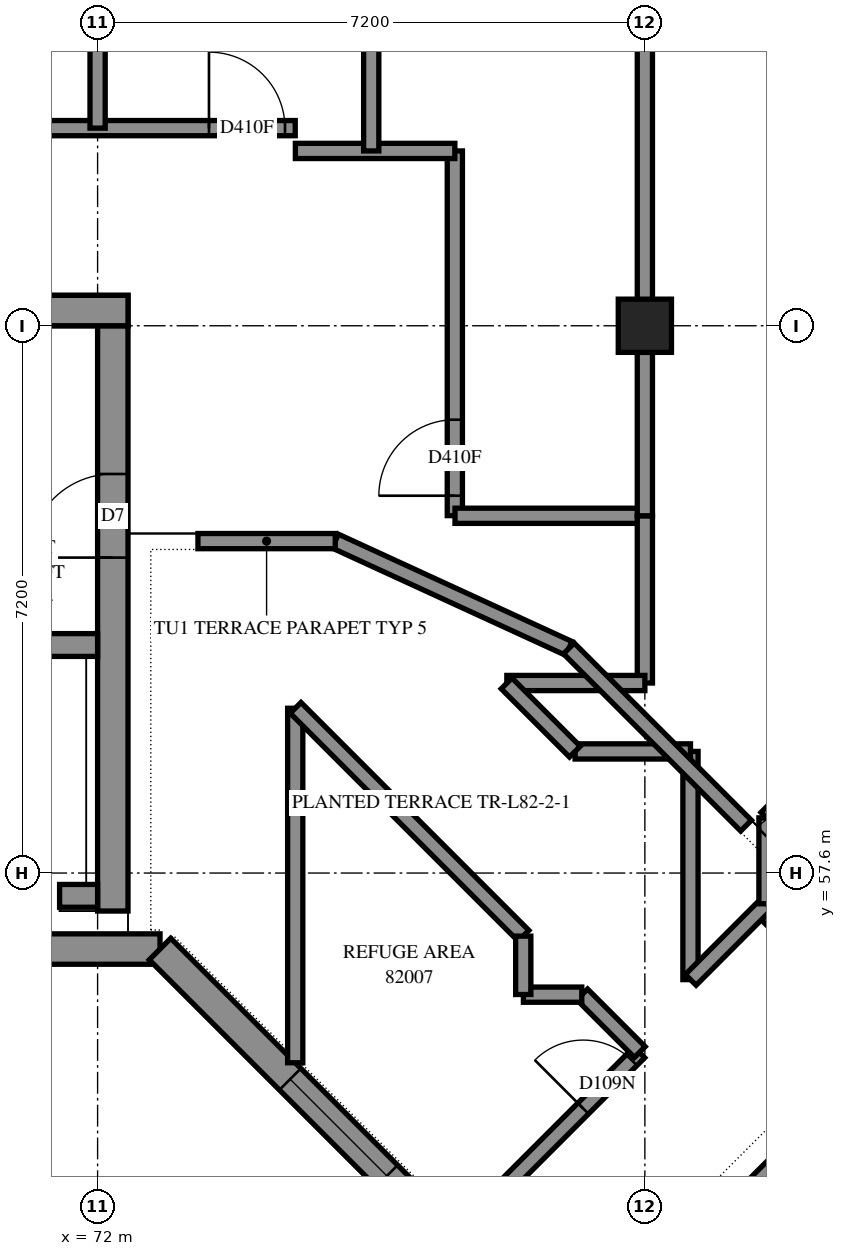
"""IFC4 building model, lengths in metres.
Left out: names, types, materials, properties, quantities, classifications, styles, units other than length and angle.
Written with IfcOpenShell. Run it as: python <this file> out.ifc"""

import sys

from ifc_helpers import new_model, si_unit, direction, frame, frame_2d, origin, origin_2d, place, context, subcontext, project, spatial, polyline, rectangle, outline, extrude, element, fill, save


model = new_model("IFC4")
c1 = context("Model", 3, precision=1e-05, world=origin(), true_north=direction((0.0, 1.0)))
c2 = subcontext(c1, "Body", "Model", "MODEL_VIEW")
j1 = project(units=[si_unit("LENGTHUNIT", "METRE"), si_unit("PLANEANGLEUNIT", "RADIAN")], contexts=[c1])
p1 = place(None, origin())
s1 = spatial("IfcSite", under=j1, at=p1, CompositionType="ELEMENT")
p2 = place(p1, origin())
s2 = spatial("IfcBuilding", under=s1, at=p2, CompositionType="ELEMENT")
p3 = place(p2, frame((0.0, 0.0, 302.0)))
s3 = spatial("IfcBuildingStorey", under=s2, at=p3, CompositionType="ELEMENT", Elevation=302.0)
p4 = place(p3, frame((79.2, 64.8, 0.0), z_axis=(0.0, 0.0, 1.0), x_axis=(1.0, 0.0, 0.0)))
e1 = element("IfcColumn", 1, at=p4, inside=s3, PredefinedType="COLUMN", context=c2, shape_type="SweptSolid", body=[
    extrude(rectangle(XDim=0.7, YDim=0.7, at=origin_2d()), origin(), (0.0, 0.0, 1.0), 3.5),
])
p5 = place(p3, frame((57.2, 65.0, -0.3), z_axis=(0.0, 0.0, 1.0), x_axis=(1.0, 0.0, 0.0)))
e2 = element("IfcWall", 2, at=p5, inside=s3, PredefinedType="SHEAR", context=c2, shape_type="SweptSolid", body=[
    extrude(outline(polyline([(0.0, 0.0), (15.2, 0.0), (15.2, 3.1), (0.0, 3.1), (0.0, 0.0)])), frame((0.0, 0.2, 0.0), z_axis=(0.0, -1.0, 0.0), x_axis=(1.0, 0.0, 0.0)), (0.0, 0.0, 1.0), 0.4),
])
p6 = place(p3, frame((72.2, 57.1, -0.3), z_axis=(0.0, 0.0, 1.0), x_axis=(0.0, 1.0, 0.0)))
e3 = element("IfcWall", 3, at=p6, inside=s3, PredefinedType="SHEAR", context=c2, shape_type="SweptSolid", body=[
    extrude(outline(polyline([(0.0, 0.0), (7.7, 0.0), (7.7, 3.1), (0.0, 3.1), (0.0, 0.0)])), frame((0.0, 0.2, 0.0), z_axis=(0.0, -1.0, 0.0), x_axis=(1.0, 0.0, 0.0)), (0.0, 0.0, 1.0), 0.4),
])
p7 = place(p6, frame((4.65, 0.0, 0.3)))
e4 = element("IfcOpeningElement", 4, at=p7, cuts=e3, PredefinedType="OPENING", context=c2, shape_type="SweptSolid", body=[
    extrude(rectangle(XDim=1.1, YDim=2.1, at=frame_2d((0.55, 1.05))), frame((0.0, 0.21, 0.0), z_axis=(0.0, -1.0, 0.0), x_axis=(1.0, 0.0, 0.0)), (0.0, 0.0, 1.0), 0.42),
])
p8 = place(p3, frame((71.5, 57.3, 0.0), z_axis=(0.0, 0.0, 1.0), x_axis=(1.0, 0.0, 0.0)))
e5 = element("IfcWall", 5, at=p8, inside=s3, PredefinedType="SOLIDWALL", context=c2, shape_type="SweptSolid", body=[
    extrude(outline(polyline([(0.0, 0.0), (0.5, 0.0), (0.5, 3.5), (0.0, 3.5), (0.0, 0.0)])), frame((0.0, 0.15, 0.0), z_axis=(0.0, -1.0, 0.0), x_axis=(1.0, 0.0, 0.0)), (0.0, 0.0, 1.0), 0.3),
])
p9 = place(p3, frame((69.528, 60.6, 0.0), z_axis=(0.0, 0.0, 1.0), x_axis=(1.0, 0.0, 0.0)))
e6 = element("IfcWall", 6, at=p9, inside=s3, PredefinedType="SOLIDWALL", context=c2, shape_type="SweptSolid", body=[
    extrude(outline(polyline([(0.0, 0.0), (2.472, 0.0), (2.472, 3.5), (0.0, 3.5), (0.0, 0.0)])), frame((0.0, 0.15, 0.0), z_axis=(0.0, -1.0, 0.0), x_axis=(1.0, 0.0, 0.0)), (0.0, 0.0, 1.0), 0.3),
])
p10 = place(p3, frame((78.705, 51.423, -0.3), z_axis=(0.0, 0.0, 1.0), x_axis=(0.7071067812, 0.7071067812, 0.0)))
e7 = element("IfcWall", 7, at=p10, inside=s3, PredefinedType="SHEAR", context=c2, shape_type="SweptSolid", body=[
    extrude(outline(polyline([(0.0, 0.0), (11.3, 0.0), (11.3, 3.1), (0.0, 3.1), (0.0, 0.0)])), frame((0.0, 0.2, 0.0), z_axis=(0.0, -1.0, 0.0), x_axis=(1.0, 0.0, 0.0)), (0.0, 0.0, 1.0), 0.4),
])
p11 = place(p10, frame((1.45, 0.0, 0.3)))
e8 = element("IfcOpeningElement", 8, at=p11, cuts=e7, PredefinedType="OPENING", context=c2, shape_type="SweptSolid", body=[
    extrude(rectangle(XDim=1.1, YDim=2.1, at=frame_2d((0.55, 1.05))), frame((0.0, 0.21, 0.0), z_axis=(0.0, -1.0, 0.0), x_axis=(1.0, 0.0, 0.0)), (0.0, 0.0, 1.0), 0.42),
])
p12 = place(p10, frame((8.25, 0.0, 0.3)))
e9 = element("IfcOpeningElement", 9, at=p12, cuts=e7, PredefinedType="OPENING", context=c2, shape_type="SweptSolid", body=[
    extrude(rectangle(XDim=1.1, YDim=2.1, at=frame_2d((0.55, 1.05))), frame((0.0, 0.21, 0.0), z_axis=(0.0, -1.0, 0.0), x_axis=(1.0, 0.0, 0.0)), (0.0, 0.0, 1.0), 0.42),
])
p13 = place(p3, frame((71.0, 56.6, 0.0), z_axis=(0.0, 0.0, 1.0), x_axis=(1.0, 0.0, 0.0)))
e10 = element("IfcWall", 10, at=p13, inside=s3, PredefinedType="SOLIDWALL", context=c2, shape_type="SweptSolid", body=[
    extrude(outline(polyline([(-0.2, -0.2), (1.738, -0.2), (1.904, 0.2), (0.2, 0.2), (-0.2, -0.2)])), origin(), (0.0, 0.0, 1.0), 3.5),
])
p14 = place(p3, frame((72.821, 56.6, 0.0), z_axis=(0.0, 0.0, 1.0), x_axis=(0.7071067812, -0.7071067812, 0.0)))
e11 = element("IfcWall", 11, at=p14, inside=s3, PredefinedType="SOLIDWALL", context=c2, shape_type="SweptSolid", body=[
    extrude(outline(polyline([(0.083, -0.2), (30.821, -0.2), (30.421, 0.2), (-0.083, 0.2), (0.083, -0.2)])), origin(), (0.0, 0.0, 1.0), 3.5),
])
p15 = place(p14, frame((2.421, 0.0, 0.7)))
e12 = element("IfcOpeningElement", 12, at=p15, cuts=e11, PredefinedType="OPENING", context=c2, shape_type="SweptSolid", body=[
    extrude(rectangle(XDim=1.8, YDim=2.2, at=frame_2d((0.9, 1.1))), frame((0.0, 0.21, 0.0), z_axis=(0.0, -1.0, 0.0), x_axis=(1.0, 0.0, 0.0)), (0.0, 0.0, 1.0), 0.42),
])
p16 = place(p14, frame((5.521, 0.0, 0.7)))
e13 = element("IfcOpeningElement", 13, at=p16, cuts=e11, PredefinedType="OPENING", context=c2, shape_type="SweptSolid", body=[
    extrude(rectangle(XDim=1.8, YDim=2.2, at=frame_2d((0.9, 1.1))), frame((0.0, 0.21, 0.0), z_axis=(0.0, -1.0, 0.0), x_axis=(1.0, 0.0, 0.0)), (0.0, 0.0, 1.0), 0.42),
])
p17 = place(p14, frame((8.921, 0.0, 0.7)))
e14 = element("IfcOpeningElement", 14, at=p17, cuts=e11, PredefinedType="OPENING", context=c2, shape_type="SweptSolid", body=[
    extrude(rectangle(XDim=1.8, YDim=2.2, at=frame_2d((0.9, 1.1))), frame((0.0, 0.21, 0.0), z_axis=(0.0, -1.0, 0.0), x_axis=(1.0, 0.0, 0.0)), (0.0, 0.0, 1.0), 0.42),
])
p18 = place(p14, frame((12.521, 0.0, 0.7)))
e15 = element("IfcOpeningElement", 15, at=p18, cuts=e11, PredefinedType="OPENING", context=c2, shape_type="SweptSolid", body=[
    extrude(rectangle(XDim=1.8, YDim=2.2, at=frame_2d((0.9, 1.1))), frame((0.0, 0.21, 0.0), z_axis=(0.0, -1.0, 0.0), x_axis=(1.0, 0.0, 0.0)), (0.0, 0.0, 1.0), 0.42),
])
p19 = place(p14, frame((16.121, 0.0, 0.7)))
e16 = element("IfcOpeningElement", 16, at=p19, cuts=e11, PredefinedType="OPENING", context=c2, shape_type="SweptSolid", body=[
    extrude(rectangle(XDim=1.8, YDim=2.2, at=frame_2d((0.9, 1.1))), frame((0.0, 0.21, 0.0), z_axis=(0.0, -1.0, 0.0), x_axis=(1.0, 0.0, 0.0)), (0.0, 0.0, 1.0), 0.42),
])
p20 = place(p14, frame((19.721, 0.0, 0.7)))
e17 = element("IfcOpeningElement", 17, at=p20, cuts=e11, PredefinedType="OPENING", context=c2, shape_type="SweptSolid", body=[
    extrude(rectangle(XDim=1.8, YDim=2.2, at=frame_2d((0.9, 1.1))), frame((0.0, 0.21, 0.0), z_axis=(0.0, -1.0, 0.0), x_axis=(1.0, 0.0, 0.0)), (0.0, 0.0, 1.0), 0.42),
])
p21 = place(p14, frame((23.071, 0.0, 0.7)))
e18 = element("IfcOpeningElement", 18, at=p21, cuts=e11, PredefinedType="OPENING", context=c2, shape_type="SweptSolid", body=[
    extrude(rectangle(XDim=1.8, YDim=2.2, at=frame_2d((0.9, 1.1))), frame((0.0, 0.21, 0.0), z_axis=(0.0, -1.0, 0.0), x_axis=(1.0, 0.0, 0.0)), (0.0, 0.0, 1.0), 0.42),
])
p22 = place(p14, frame((26.921, 0.0, 0.7)))
e19 = element("IfcOpeningElement", 19, at=p22, cuts=e11, PredefinedType="OPENING", context=c2, shape_type="SweptSolid", body=[
    extrude(rectangle(XDim=1.8, YDim=2.2, at=frame_2d((0.9, 1.1))), frame((0.0, 0.21, 0.0), z_axis=(0.0, -1.0, 0.0), x_axis=(1.0, 0.0, 0.0)), (0.0, 0.0, 1.0), 0.42),
])
p23 = place(p3, frame((78.2, 60.555, 0.0), z_axis=(0.0, 0.0, 1.0), x_axis=(-0.9086892736, 0.4174731177, 0.0)))
e20 = element("IfcWall", 20, at=p23, inside=s3, PredefinedType="PARAPET", context=c2, shape_type="SweptSolid", body=[
    extrude(outline(polyline([(-0.018, -0.1), (3.404, -0.1), (3.36, 0.1), (0.018, 0.1), (-0.018, -0.1)])), origin(), (0.0, 0.0, 1.0), 0.25),
])
p24 = place(p3, frame((57.2, 67.4, 0.0), z_axis=(0.0, 0.0, 1.0), x_axis=(1.0, 0.0, 0.0)))
e21 = element("IfcWall", 21, at=p24, inside=s3, PredefinedType="PARTITIONING", context=c2, shape_type="SweptSolid", body=[
    extrude(rectangle(XDim=17.4, YDim=0.2, at=frame_2d((8.7, 0.0))), origin(), (0.0, 0.0, 1.0), 3.5),
])
p25 = place(p24, frame((1.881, 0.0, 0.0)))
e22 = element("IfcOpeningElement", 22, at=p25, cuts=e21, PredefinedType="OPENING", context=c2, shape_type="SweptSolid", body=[
    extrude(rectangle(XDim=1.0, YDim=2.1, at=frame_2d((0.5, 1.05))), frame((0.0, 0.11, 0.0), z_axis=(0.0, -1.0, 0.0), x_axis=(1.0, 0.0, 0.0)), (0.0, 0.0, 1.0), 0.22),
])
p26 = place(p24, frame((6.338, 0.0, 0.0)))
e23 = element("IfcOpeningElement", 23, at=p26, cuts=e21, PredefinedType="OPENING", context=c2, shape_type="SweptSolid", body=[
    extrude(rectangle(XDim=1.0, YDim=2.1, at=frame_2d((0.5, 1.05))), frame((0.0, 0.11, 0.0), z_axis=(0.0, -1.0, 0.0), x_axis=(1.0, 0.0, 0.0)), (0.0, 0.0, 1.0), 0.22),
])
p27 = place(p24, frame((11.768, 0.0, 0.0)))
e24 = element("IfcOpeningElement", 24, at=p27, cuts=e21, PredefinedType="OPENING", context=c2, shape_type="SweptSolid", body=[
    extrude(rectangle(XDim=1.0, YDim=2.1, at=frame_2d((0.5, 1.05))), frame((0.0, 0.11, 0.0), z_axis=(0.0, -1.0, 0.0), x_axis=(1.0, 0.0, 0.0)), (0.0, 0.0, 1.0), 0.22),
])
p28 = place(p24, frame((16.265, 0.0, 0.0)))
e25 = element("IfcOpeningElement", 25, at=p28, cuts=e21, PredefinedType="OPENING", context=c2, shape_type="SweptSolid", body=[
    extrude(rectangle(XDim=1.0, YDim=2.1, at=frame_2d((0.5, 1.05))), frame((0.0, 0.11, 0.0), z_axis=(0.0, -1.0, 0.0), x_axis=(1.0, 0.0, 0.0)), (0.0, 0.0, 1.0), 0.22),
])
p29 = place(p3, frame((80.804, 56.912, 0.0), z_axis=(0.0, 0.0, 1.0), x_axis=(0.7069896038, 0.7072239391, 0.0)))
e26 = element("IfcWall", 26, at=p29, inside=s3, PredefinedType="PARTITIONING", context=c2, shape_type="SweptSolid", body=[
    extrude(rectangle(XDim=8.535, YDim=0.2, at=frame_2d((4.267, 0.0))), origin(), (0.0, 0.0, 1.0), 3.5),
])
p30 = place(p29, frame((0.825, 0.0, 0.0)))
e27 = element("IfcOpeningElement", 27, at=p30, cuts=e26, PredefinedType="OPENING", context=c2, shape_type="SweptSolid", body=[
    extrude(rectangle(XDim=1.0, YDim=2.1, at=frame_2d((0.5, 1.05))), frame((0.0, 0.11, 0.0), z_axis=(0.0, -1.0, 0.0), x_axis=(1.0, 0.0, 0.0)), (0.0, 0.0, 1.0), 0.22),
])
p31 = place(p3, frame((79.2, 64.45, 0.0), z_axis=(0.0, 0.0, 1.0), x_axis=(0.0, 1.0, 0.0)))
e28 = element("IfcWall", 28, at=p31, inside=s3, PredefinedType="PARTITIONING", context=c2, shape_type="SweptSolid", body=[
    extrude(rectangle(XDim=7.9, YDim=0.2, at=frame_2d((3.95, 0.0))), origin(), (0.0, 0.0, 1.0), 3.5),
])
p32 = place(p3, frame((74.6, 55.104, 0.0), z_axis=(0.0, 0.0, 1.0), x_axis=(0.0, 1.0, 0.0)))
e29 = element("IfcWall", 29, at=p32, inside=s3, PredefinedType="PARTITIONING", context=c2, shape_type="SweptSolid", body=[
    extrude(rectangle(XDim=4.664, YDim=0.2, at=frame_2d((2.332, 0.0))), origin(), (0.0, 0.0, 1.0), 3.5),
])
p33 = place(p3, frame((76.7, 62.302, 0.0), z_axis=(0.0, 0.0, 1.0), x_axis=(0.0, 1.0, 0.0)))
e30 = element("IfcWall", 30, at=p33, inside=s3, PredefinedType="PARTITIONING", context=c2, shape_type="SweptSolid", body=[
    extrude(rectangle(XDim=4.798, YDim=0.2, at=frame_2d((2.399, 0.0))), origin(), (0.0, 0.0, 1.0), 3.5),
])
p34 = place(p33, frame((0.262, 0.0, 0.0)))
e31 = element("IfcOpeningElement", 31, at=p34, cuts=e30, PredefinedType="OPENING", context=c2, shape_type="SweptSolid", body=[
    extrude(rectangle(XDim=1.0, YDim=2.1, at=frame_2d((0.5, 1.05))), frame((0.0, 0.11, 0.0), z_axis=(0.0, -1.0, 0.0), x_axis=(1.0, 0.0, 0.0)), (0.0, 0.0, 1.0), 0.22),
])
p35 = place(p3, frame((72.0, 67.4, 0.0), z_axis=(0.0, 0.0, 1.0), x_axis=(0.0, 1.0, 0.0)))
e32 = element("IfcWall", 32, at=p35, inside=s3, PredefinedType="PARTITIONING", context=c2, shape_type="SweptSolid", body=[
    extrude(rectangle(XDim=4.95, YDim=0.2, at=frame_2d((2.475, 0.0))), origin(), (0.0, 0.0, 1.0), 3.5),
])
p36 = place(p3, frame((74.605, 59.773, 0.0), z_axis=(0.0, 0.0, 1.0), x_axis=(0.7071067812, -0.7071067812, 0.0)))
e33 = element("IfcWall", 33, at=p36, inside=s3, PredefinedType="PARTITIONING", context=c2, shape_type="SweptSolid", body=[
    extrude(rectangle(XDim=4.24, YDim=0.2, at=frame_2d((2.12, 0.0))), origin(), (0.0, 0.0, 1.0), 3.5),
])
p37 = place(p3, frame((76.795, 52.909, 0.0), z_axis=(0.0, 0.0, 1.0), x_axis=(0.7071067812, 0.7071067812, 0.0)))
e34 = element("IfcWall", 34, at=p37, inside=s3, PredefinedType="PARTITIONING", context=c2, shape_type="SweptSolid", body=[
    extrude(rectangle(XDim=3.298, YDim=0.2, at=frame_2d((1.649, 0.0))), origin(), (0.0, 0.0, 1.0), 3.5),
])
p38 = place(p37, frame((2.254, 0.0, 0.0)))
e35 = element("IfcOpeningElement", 35, at=p38, cuts=e34, PredefinedType="OPENING", context=c2, shape_type="SweptSolid", body=[
    extrude(rectangle(XDim=0.9, YDim=2.1, at=frame_2d((0.45, 1.05))), frame((0.0, 0.11, 0.0), z_axis=(0.0, -1.0, 0.0), x_axis=(1.0, 0.0, 0.0)), (0.0, 0.0, 1.0), 0.22),
])
p39 = place(p3, frame((79.8, 56.198, 0.0), z_axis=(0.0, 0.0, 1.0), x_axis=(0.0, 1.0, 0.0)))
e36 = element("IfcWall", 36, at=p39, inside=s3, PredefinedType="PARTITIONING", context=c2, shape_type="SweptSolid", body=[
    extrude(rectangle(XDim=3.002, YDim=0.2, at=frame_2d((1.501, 0.0))), origin(), (0.0, 0.0, 1.0), 3.5),
])
p40 = place(p3, frame((76.702, 62.3, 0.0), z_axis=(0.0, 0.0, 1.0), x_axis=(1.0, 0.0, 0.0)))
e37 = element("IfcWall", 37, at=p40, inside=s3, PredefinedType="PARTITIONING", context=c2, shape_type="SweptSolid", body=[
    extrude(rectangle(XDim=2.498, YDim=0.2, at=frame_2d((1.249, 0.0))), origin(), (0.0, 0.0, 1.0), 3.5),
])
p41 = place(p3, frame((79.2, 60.1, 0.0), z_axis=(0.0, 0.0, 1.0), x_axis=(0.0, 1.0, 0.0)))
e38 = element("IfcWall", 38, at=p41, inside=s3, PredefinedType="PARTITIONING", context=c2, shape_type="SweptSolid", body=[
    extrude(rectangle(XDim=2.2, YDim=0.2, at=frame_2d((1.1, 0.0))), origin(), (0.0, 0.0, 1.0), 3.5),
])
p42 = place(p3, frame((79.2, 62.3, 0.0), z_axis=(0.0, 0.0, 1.0), x_axis=(0.0, 1.0, 0.0)))
e39 = element("IfcWall", 39, at=p42, inside=s3, PredefinedType="PARTITIONING", context=c2, shape_type="SweptSolid", body=[
    extrude(rectangle(XDim=2.15, YDim=0.2, at=frame_2d((1.075, 0.0))), origin(), (0.0, 0.0, 1.0), 3.5),
])
p43 = place(p3, frame((74.602, 67.1, 0.0), z_axis=(0.0, 0.0, 1.0), x_axis=(1.0, 0.0, 0.0)))
e40 = element("IfcWall", 40, at=p43, inside=s3, PredefinedType="PARTITIONING", context=c2, shape_type="SweptSolid", body=[
    extrude(rectangle(XDim=2.098, YDim=0.2, at=frame_2d((1.049, 0.0))), origin(), (0.0, 0.0, 1.0), 3.5),
])
p44 = place(p3, frame((77.384, 60.1, 0.0), z_axis=(0.0, 0.0, 1.0), x_axis=(1.0, 0.0, 0.0)))
e41 = element("IfcWall", 41, at=p44, inside=s3, PredefinedType="PARTITIONING", context=c2, shape_type="SweptSolid", body=[
    extrude(rectangle(XDim=1.816, YDim=0.2, at=frame_2d((0.908, 0.0))), origin(), (0.0, 0.0, 1.0), 3.5),
])
p45 = place(p3, frame((78.282, 59.2, 0.0), z_axis=(0.0, 0.0, 1.0), x_axis=(1.0, 0.0, 0.0)))
e42 = element("IfcWall", 42, at=p45, inside=s3, PredefinedType="PARTITIONING", context=c2, shape_type="SweptSolid", body=[
    extrude(rectangle(XDim=1.518, YDim=0.2, at=frame_2d((0.759, 0.0))), origin(), (0.0, 0.0, 1.0), 3.5),
])
p46 = place(p3, frame((79.803, 56.195, 0.0), z_axis=(0.0, 0.0, 1.0), x_axis=(0.7063986127, 0.7078142412, 0.0)))
e43 = element("IfcWall", 43, at=p46, inside=s3, PredefinedType="PARTITIONING", context=c2, shape_type="SweptSolid", body=[
    extrude(rectangle(XDim=1.413, YDim=0.2, at=frame_2d((0.706, 0.0))), origin(), (0.0, 0.0, 1.0), 3.5),
])
p47 = place(p3, frame((77.381, 60.095, 0.0), z_axis=(0.0, 0.0, 1.0), x_axis=(0.7071067812, -0.7071067812, 0.0)))
e44 = element("IfcWall", 44, at=p47, inside=s3, PredefinedType="PARTITIONING", context=c2, shape_type="SweptSolid", body=[
    extrude(rectangle(XDim=1.27, YDim=0.2, at=frame_2d((0.635, 0.0))), origin(), (0.0, 0.0, 1.0), 3.5),
])
p48 = place(p3, frame((80.8, 57.196, 0.0), z_axis=(0.0, 0.0, 1.0), x_axis=(0.0, 1.0, 0.0)))
e45 = element("IfcWall", 45, at=p48, inside=s3, PredefinedType="PARTITIONING", context=c2, shape_type="SweptSolid", body=[
    extrude(rectangle(XDim=1.13, YDim=0.2, at=frame_2d((0.565, 0.0))), origin(), (0.0, 0.0, 1.0), 3.5),
])
p49 = place(p3, frame((78.375, 56.003, 0.0), z_axis=(0.0, 0.0, 1.0), x_axis=(0.7071067812, -0.7071067812, 0.0)))
e46 = element("IfcWall", 46, at=p49, inside=s3, PredefinedType="PARTITIONING", context=c2, shape_type="SweptSolid", body=[
    extrude(rectangle(XDim=1.072, YDim=0.2, at=frame_2d((0.536, 0.0))), origin(), (0.0, 0.0, 1.0), 3.5),
])
for number, where, z_axis, x_axis in (
    (47, (77.602, 56.0, 0.0), (0.0, 0.0, 1.0), (1.0, 0.0, 0.0)),
    (48, (77.6, 56.002, 0.0), (0.0, 0.0, 1.0), (0.0, 1.0, 0.0)),
):
    element("IfcWall", number, at=place(p3, frame(where, z_axis=z_axis, x_axis=x_axis)), inside=s3, PredefinedType="PARTITIONING", context=c2, shape_type="SweptSolid", body=[
        extrude(rectangle(XDim=0.768, YDim=0.2, at=frame_2d((0.384, 0.0))), origin(), (0.0, 0.0, 1.0), 3.5),
    ])
p50 = place(p3, frame((80.531, 58.224, 0.0), z_axis=(0.0, 0.0, 1.0), x_axis=(-0.7071219462, 0.7070916158, 0.0)))
e49 = element("IfcWall", 49, at=p50, inside=s3, PredefinedType="PARAPET", context=c2, shape_type="SweptSolid", body=[
    extrude(outline(polyline([(0.0, -0.1), (3.315, -0.1), (3.279, 0.1), (0.0, 0.1), (0.0, -0.1)])), origin(), (0.0, 0.0, 1.0), 0.25),
])
p51 = place(p3, frame((75.127, 61.967, 0.0), z_axis=(0.0, 0.0, 1.0), x_axis=(-1.0, 0.0, 0.0)))
e50 = element("IfcWall", 50, at=p51, inside=s3, PredefinedType="PARAPET", context=c2, shape_type="SweptSolid", body=[
    extrude(outline(polyline([(-0.022, -0.1), (1.807, -0.1), (1.807, 0.1), (0.022, 0.1), (-0.022, -0.1)])), origin(), (0.0, 0.0, 1.0), 0.25),
])
p52 = place(p3, frame((80.799, 58.327, 0.0), z_axis=(0.0, 0.0, 1.0), x_axis=(0.7071067812, 0.7071067812, 0.0)))
e51 = element("IfcWall", 51, at=p52, inside=s3, PredefinedType="PARTITIONING", context=c2, shape_type="SweptSolid", body=[
    extrude(outline(polyline([(0.0, -0.1), (9.338, -0.1), (9.338, 0.1), (0.0, 0.1), (0.0, -0.1)])), origin(), (0.0, 0.0, 1.0), 3.5),
])
p53 = place(p3, frame((75.6, 67.1, 0.0), z_axis=(0.0, 0.0, 1.0), x_axis=(0.0, 1.0, 0.0)))
e52 = element("IfcWall", 52, at=p53, inside=s3, PredefinedType="PARTITIONING", context=c2, shape_type="SweptSolid", body=[
    extrude(outline(polyline([(0.0, -0.1), (5.7, -0.1), (5.7, 0.1), (0.0, 0.1), (0.0, -0.1)])), origin(), (0.0, 0.0, 1.0), 3.5),
])
p54 = place(p15, origin())
e53 = element("IfcWindow", 53, at=p54, inside=s3, PartitioningType="SINGLE_PANEL", PredefinedType="WINDOW", context=c2, shape_type="SweptSolid", body=[
    extrude(rectangle(XDim=1.8, YDim=2.2, at=frame_2d((0.9, 1.1))), frame((0.0, 0.08, 0.0), z_axis=(0.0, -1.0, 0.0), x_axis=(1.0, 0.0, 0.0)), (0.0, 0.0, 1.0), 0.06),
])
fill(e12, e53)
p55 = place(p7, origin())
e54 = element("IfcDoor", 54, at=p55, inside=s3, OperationType="SINGLE_SWING_RIGHT", PredefinedType="DOOR", context=c2, shape_type="SweptSolid", body=[
    extrude(rectangle(XDim=1.1, YDim=2.1, at=frame_2d((0.55, 1.05))), frame((0.0, 0.025, 0.0), z_axis=(0.0, -1.0, 0.0), x_axis=(1.0, 0.0, 0.0)), (0.0, 0.0, 1.0), 0.05),
])
fill(e4, e54)
p56 = place(p28, origin())
e55 = element("IfcDoor", 55, at=p56, inside=s3, OperationType="SINGLE_SWING_RIGHT", PredefinedType="DOOR", context=c2, shape_type="SweptSolid", body=[
    extrude(rectangle(XDim=1.0, YDim=2.1, at=frame_2d((0.5, 1.05))), frame((0.0, 0.025, 0.0), z_axis=(0.0, -1.0, 0.0), x_axis=(1.0, 0.0, 0.0)), (0.0, 0.0, 1.0), 0.05),
])
fill(e25, e55)
p57 = place(p34, origin())
e56 = element("IfcDoor", 56, at=p57, inside=s3, OperationType="SINGLE_SWING_LEFT", PredefinedType="DOOR", context=c2, shape_type="SweptSolid", body=[
    extrude(rectangle(XDim=1.0, YDim=2.1, at=frame_2d((0.5, 1.05))), frame((0.0, 0.025, 0.0), z_axis=(0.0, -1.0, 0.0), x_axis=(1.0, 0.0, 0.0)), (0.0, 0.0, 1.0), 0.05),
])
fill(e31, e56)
p58 = place(p38, origin())
e57 = element("IfcDoor", 57, at=p58, inside=s3, OperationType="SINGLE_SWING_LEFT", PredefinedType="DOOR", context=c2, shape_type="SweptSolid", body=[
    extrude(rectangle(XDim=0.9, YDim=2.1, at=frame_2d((0.45, 1.05))), frame((0.0, 0.025, 0.0), z_axis=(0.0, -1.0, 0.0), x_axis=(1.0, 0.0, 0.0)), (0.0, 0.0, 1.0), 0.05),
])
fill(e35, e57)
save(model, sys.argv[1])
